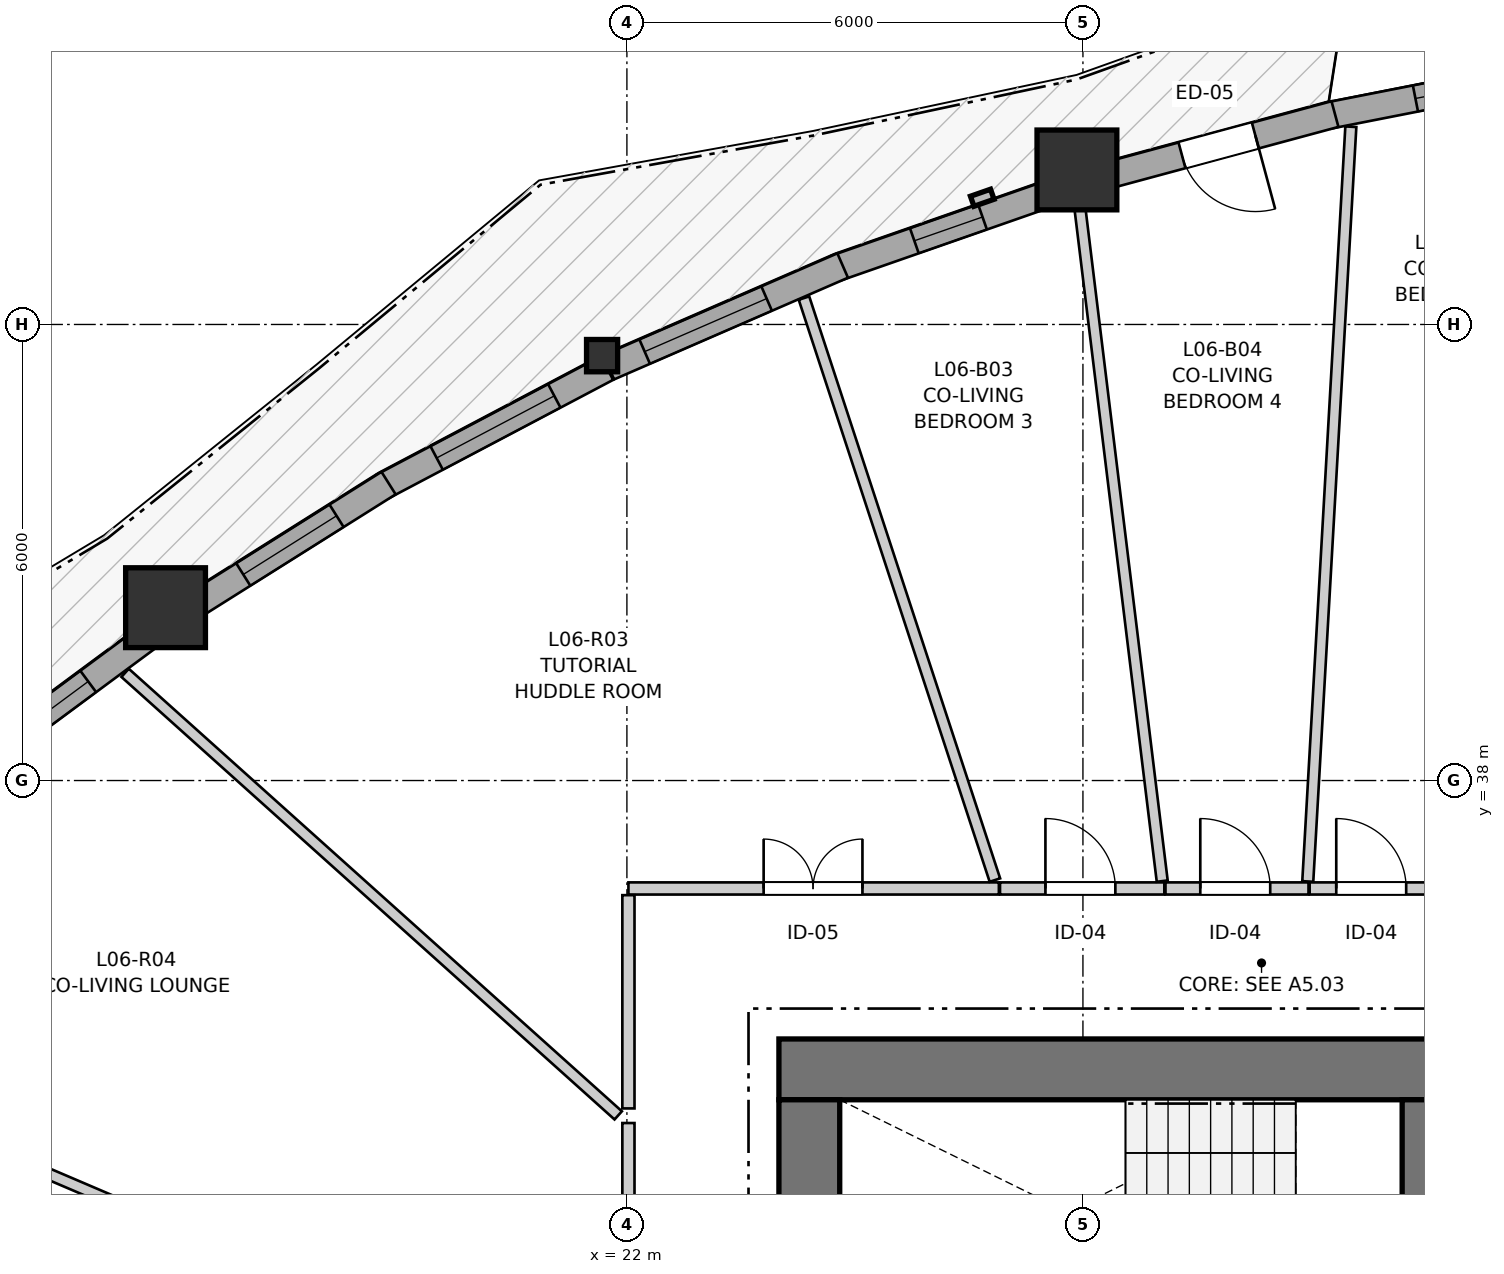
"""IFC4 building model, lengths in metres.
Left out: names, types, materials, properties, quantities, classifications, styles, units other than length and angle.
Written with IfcOpenShell. Run it as: python <this file> out.ifc"""

import sys

from ifc_helpers import new_model, si_unit, direction, frame, frame_2d, origin, origin_2d, place, context, subcontext, project, spatial, rectangle, i_section, extrude, source, transform, mapped, element, fill, save


model = new_model("IFC4")
c1 = context("Model", 3, precision=1e-05, world=origin(), true_north=direction((0.0, 1.0)))
c2 = subcontext(c1, "Body", "Model", "MODEL_VIEW")
j1 = project(units=[si_unit("LENGTHUNIT", "METRE"), si_unit("PLANEANGLEUNIT", "RADIAN")], contexts=[c1])
p1 = place(None, origin())
s1 = spatial("IfcSite", under=j1, at=p1, CompositionType="ELEMENT")
p2 = place(p1, origin())
s2 = spatial("IfcBuilding", under=s1, at=p2, CompositionType="ELEMENT")
p3 = place(p2, frame((0.0, 0.0, 23.8)))
s3 = spatial("IfcBuildingStorey", under=s2, at=p3, CompositionType="ELEMENT", Elevation=23.8)
p4 = place(p3, frame((36.7, 34.2, 0.0), z_axis=(0.0, 0.0, 1.0), x_axis=(-1.0, 0.0, 0.0)))
e1 = element("IfcWall", 1, at=p4, inside=s3, PredefinedType="SHEAR", context=c2, shape_type="SweptSolid", body=[
    extrude(rectangle(XDim=12.7, YDim=0.8, at=frame_2d((6.35, 0.0))), origin(), (0.0, 0.0, 1.0), 2.935),
])
p5 = place(p3, frame((24.4, 33.8, 0.0), z_axis=(0.0, 0.0, 1.0), x_axis=(0.0, -1.0, 0.0)))
e2 = element("IfcWall", 2, at=p5, inside=s3, PredefinedType="SHEAR", context=c2, shape_type="SweptSolid", body=[
    extrude(rectangle(XDim=15.6, YDim=0.8, at=frame_2d((7.8, 0.0))), origin(), (0.0, 0.0, 1.0), 2.935),
])
p6 = place(p5, frame((7.05, 0.0, 0.0)))
e3 = element("IfcOpeningElement", 3, at=p6, cuts=e2, PredefinedType="OPENING", context=c2, shape_type="SweptSolid", body=[
    extrude(rectangle(XDim=1.5, YDim=2.15, at=frame_2d((0.75, 1.075))), frame((0.0, 0.41, 0.0), z_axis=(0.0, -1.0, 0.0), x_axis=(1.0, 0.0, 0.0)), (0.0, 0.0, 1.0), 0.82),
])
p7 = place(p5, frame((3.52, 0.0, 0.0)))
e4 = element("IfcOpeningElement", 4, at=p7, cuts=e2, PredefinedType="OPENING", context=c2, shape_type="SweptSolid", body=[
    extrude(rectangle(XDim=0.86, YDim=2.05, at=frame_2d((0.43, 1.025))), frame((0.0, 0.41, 0.0), z_axis=(0.0, -1.0, 0.0), x_axis=(1.0, 0.0, 0.0)), (0.0, 0.0, 1.0), 0.82),
])
p8 = place(p5, frame((11.22, 0.0, 0.0)))
e5 = element("IfcOpeningElement", 5, at=p8, cuts=e2, PredefinedType="OPENING", context=c2, shape_type="SweptSolid", body=[
    extrude(rectangle(XDim=0.86, YDim=2.05, at=frame_2d((0.43, 1.025))), frame((0.0, 0.41, 0.0), z_axis=(0.0, -1.0, 0.0), x_axis=(1.0, 0.0, 0.0)), (0.0, 0.0, 1.0), 0.82),
])
p9 = place(p3, frame((32.4, 30.85, 0.0), z_axis=(0.0, 0.0, 1.0), x_axis=(0.0, 1.0, 0.0)))
e6 = element("IfcWall", 6, at=p9, inside=s3, PredefinedType="SHEAR", context=c2, shape_type="SweptSolid", body=[
    extrude(rectangle(XDim=2.95, YDim=0.4, at=frame_2d((1.475, 0.0))), origin(), (0.0, 0.0, 1.0), 2.935),
])
m1 = source(origin(), c2, "Body", "SweptSolid", [
    extrude(rectangle(XDim=1.05, YDim=1.05, at=origin_2d()), origin(), (0.0, 0.0, 1.0), 2.935),
])
p10 = place(p3, frame((27.921, 46.033, 0.0), z_axis=(0.0, 0.0, 1.0), x_axis=(1.0, 0.0, 0.0)))
e7 = element("IfcColumn", 7, at=p10, inside=s3, PredefinedType="COLUMN", context=c2, shape_type="MappedRepresentation", body=[
    mapped(m1, transform((0.0, 0.0, 0.0), x_axis=(1.0, 0.0, 0.0), y_axis=(0.0, 1.0, 0.0), z_axis=(0.0, 0.0, 1.0), scale=1.0)),
])
m2 = source(origin(), c2, "Body", "SweptSolid", [
    extrude(i_section(OverallWidth=0.409, OverallDepth=0.425, WebThickness=0.03, FlangeThickness=0.048, FilletRadius=0.015, at=origin_2d()), origin(), (0.0, 0.0, 1.0), 2.935),
])
p11 = place(p3, frame((21.673, 43.59, 0.0), z_axis=(0.0, 0.0, 1.0), x_axis=(1.0, 0.0, 0.0)))
e8 = element("IfcColumn", 8, at=p11, inside=s3, PredefinedType="PILASTER", context=c2, shape_type="MappedRepresentation", body=[
    mapped(m2, transform((0.0, 0.0, 0.0), x_axis=(1.0, 0.0, 0.0), y_axis=(0.0, 1.0, 0.0), z_axis=(0.0, 0.0, 1.0), scale=1.0)),
])
p12 = place(p3, frame((15.93, 40.274, 0.0), z_axis=(0.0, 0.0, 1.0), x_axis=(1.0, 0.0, 0.0)))
e9 = element("IfcColumn", 9, at=p12, inside=s3, PredefinedType="COLUMN", context=c2, shape_type="MappedRepresentation", body=[
    mapped(m1, transform((0.0, 0.0, 0.0), x_axis=(1.0, 0.0, 0.0), y_axis=(0.0, 1.0, 0.0), z_axis=(0.0, 0.0, 1.0), scale=1.0)),
])
p13 = place(p3, frame((34.687, 47.427, 0.0), z_axis=(0.0, 0.0, 1.0), x_axis=(-0.981220485855, -0.192889497219, 0.0)))
e10 = element("IfcWall", 10, at=p13, inside=s3, PredefinedType="SOLIDWALL", context=c2, shape_type="SweptSolid", body=[
    extrude(rectangle(XDim=3.522, YDim=0.35, at=frame_2d((1.761, 0.0))), origin(), (0.0, 0.0, 1.0), 2.415),
])
p14 = place(p13, frame((0.956, 0.0, 0.82)))
e11 = element("IfcOpeningElement", 11, at=p14, cuts=e10, PredefinedType="OPENING", context=c2, shape_type="SweptSolid", body=[
    extrude(rectangle(XDim=1.4, YDim=1.35, at=frame_2d((0.7, 0.675))), frame((0.0, 0.185, 0.0), z_axis=(0.0, -1.0, 0.0), x_axis=(1.0, 0.0, 0.0)), (0.0, 0.0, 1.0), 0.37),
])
p15 = place(p3, frame((31.316, 46.768, 0.0), z_axis=(0.0, 0.0, 1.0), x_axis=(-0.965446721184, -0.260600515261, 0.0)))
e12 = element("IfcWall", 12, at=p15, inside=s3, PredefinedType="SOLIDWALL", context=c2, shape_type="SweptSolid", body=[
    extrude(rectangle(XDim=3.169, YDim=0.35, at=frame_2d((1.585, 0.0))), origin(), (0.0, 0.0, 1.0), 2.415),
])
p16 = place(p15, frame((1.085, 0.0, 0.0)))
e13 = element("IfcOpeningElement", 13, at=p16, cuts=e12, PredefinedType="OPENING", context=c2, shape_type="SweptSolid", body=[
    extrude(rectangle(XDim=1.0, YDim=2.1, at=frame_2d((0.5, 1.05))), frame((0.0, 0.185, 0.0), z_axis=(0.0, -1.0, 0.0), x_axis=(1.0, 0.0, 0.0)), (0.0, 0.0, 1.0), 0.37),
])
p17 = place(p3, frame((27.695, 45.769, 0.0), z_axis=(0.0, 0.0, 1.0), x_axis=(-0.94414288081, -0.329536372221, 0.0)))
e14 = element("IfcWall", 14, at=p17, inside=s3, PredefinedType="SOLIDWALL", context=c2, shape_type="SweptSolid", body=[
    extrude(rectangle(XDim=3.113, YDim=0.35, at=frame_2d((1.557, 0.0))), origin(), (0.0, 0.0, 1.0), 2.415),
])
p18 = place(p17, frame((1.077, 0.0, 0.82)))
e15 = element("IfcOpeningElement", 15, at=p18, cuts=e14, PredefinedType="OPENING", context=c2, shape_type="SweptSolid", body=[
    extrude(rectangle(XDim=0.95, YDim=1.35, at=frame_2d((0.475, 0.675))), frame((0.0, 0.185, 0.0), z_axis=(0.0, -1.0, 0.0), x_axis=(1.0, 0.0, 0.0)), (0.0, 0.0, 1.0), 0.37),
])
p19 = place(p3, frame((24.839, 44.775, 0.0), z_axis=(0.0, 0.0, 1.0), x_axis=(-0.917081622701, -0.398699507529, 0.0)))
e16 = element("IfcWall", 16, at=p19, inside=s3, PredefinedType="SOLIDWALL", context=c2, shape_type="SweptSolid", body=[
    extrude(rectangle(XDim=3.356, YDim=0.35, at=frame_2d((1.678, 0.0))), origin(), (0.0, 0.0, 1.0), 2.415),
])
p20 = place(p19, frame((1.091, 0.0, 0.82)))
e17 = element("IfcOpeningElement", 17, at=p20, cuts=e16, PredefinedType="OPENING", context=c2, shape_type="SweptSolid", body=[
    extrude(rectangle(XDim=1.75, YDim=1.3, at=frame_2d((0.875, 0.65))), frame((0.0, 0.185, 0.0), z_axis=(0.0, -1.0, 0.0), x_axis=(1.0, 0.0, 0.0)), (0.0, 0.0, 1.0), 0.37),
])
p21 = place(p3, frame((21.737, 43.426, 0.0), z_axis=(0.0, 0.0, 1.0), x_axis=(-0.884406567815, -0.466717283595, 0.0)))
e18 = element("IfcWall", 18, at=p21, inside=s3, PredefinedType="SOLIDWALL", context=c2, shape_type="SweptSolid", body=[
    extrude(rectangle(XDim=3.336, YDim=0.35, at=frame_2d((1.668, 0.0))), origin(), (0.0, 0.0, 1.0), 2.415),
])
p22 = place(p21, frame((0.783, 0.0, 0.82)))
e19 = element("IfcOpeningElement", 19, at=p22, cuts=e18, PredefinedType="OPENING", context=c2, shape_type="SweptSolid", body=[
    extrude(rectangle(XDim=1.75, YDim=1.3, at=frame_2d((0.875, 0.65))), frame((0.0, 0.185, 0.0), z_axis=(0.0, -1.0, 0.0), x_axis=(1.0, 0.0, 0.0)), (0.0, 0.0, 1.0), 0.37),
])
p23 = place(p3, frame((18.864, 41.913, 0.0), z_axis=(0.0, 0.0, 1.0), x_axis=(-0.84643287852, -0.532495429239, 0.0)))
e20 = element("IfcWall", 20, at=p23, inside=s3, PredefinedType="SOLIDWALL", context=c2, shape_type="SweptSolid", body=[
    extrude(rectangle(XDim=3.056, YDim=0.35, at=frame_2d((1.528, 0.0))), origin(), (0.0, 0.0, 1.0), 2.415),
])
p24 = place(p23, frame((0.808, 0.0, 0.82)))
e21 = element("IfcOpeningElement", 21, at=p24, cuts=e20, PredefinedType="OPENING", context=c2, shape_type="SweptSolid", body=[
    extrude(rectangle(XDim=1.45, YDim=1.25, at=frame_2d((0.725, 0.625))), frame((0.0, 0.185, 0.0), z_axis=(0.0, -1.0, 0.0), x_axis=(1.0, 0.0, 0.0)), (0.0, 0.0, 1.0), 0.37),
])
p25 = place(p3, frame((15.793, 39.955, 0.0), z_axis=(0.0, 0.0, 1.0), x_axis=(-0.803813051054, -0.594881987419, 0.0)))
e22 = element("IfcWall", 22, at=p25, inside=s3, PredefinedType="SOLIDWALL", context=c2, shape_type="SweptSolid", body=[
    extrude(rectangle(XDim=3.075, YDim=0.35, at=frame_2d((1.538, 0.0))), origin(), (0.0, 0.0, 1.0), 2.415),
])
p26 = place(p25, frame((1.095, 0.0, 0.82)))
e23 = element("IfcOpeningElement", 23, at=p26, cuts=e22, PredefinedType="OPENING", context=c2, shape_type="SweptSolid", body=[
    extrude(rectangle(XDim=1.45, YDim=1.25, at=frame_2d((0.725, 0.625))), frame((0.0, 0.185, 0.0), z_axis=(0.0, -1.0, 0.0), x_axis=(1.0, 0.0, 0.0)), (0.0, 0.0, 1.0), 0.37),
])
p27 = place(p3, frame((22.02, 36.58, 0.0), z_axis=(0.0, 0.0, 1.0), x_axis=(1.0, 0.0, 0.0)))
e24 = element("IfcWall", 24, at=p27, inside=s3, PredefinedType="PARTITIONING", context=c2, shape_type="SweptSolid", body=[
    extrude(rectangle(XDim=4.874, YDim=0.16, at=frame_2d((2.437, 0.0))), origin(), (0.0, 0.0, 1.0), 2.543),
])
p28 = place(p27, frame((1.779, 0.0, 0.0)))
e25 = element("IfcOpeningElement", 25, at=p28, cuts=e24, PredefinedType="OPENING", context=c2, shape_type="SweptSolid", body=[
    extrude(rectangle(XDim=1.3, YDim=2.1, at=frame_2d((0.65, 1.05))), frame((0.0, 0.09, 0.0), z_axis=(0.0, -1.0, 0.0), x_axis=(1.0, 0.0, 0.0)), (0.0, 0.0, 1.0), 0.18),
])
p29 = place(p3, frame((22.02, 29.545, 0.0), z_axis=(0.0, 0.0, 1.0), x_axis=(0.0, 1.0, 0.0)))
e26 = element("IfcWall", 26, at=p29, inside=s3, PredefinedType="PARTITIONING", context=c2, shape_type="SweptSolid", body=[
    extrude(rectangle(XDim=3.949, YDim=0.16, at=frame_2d((1.975, 0.0))), origin(), (0.0, 0.0, 1.0), 2.935),
])
p30 = place(p29, frame((1.323, 0.0, 0.0)))
e27 = element("IfcOpeningElement", 27, at=p30, cuts=e26, PredefinedType="OPENING", context=c2, shape_type="SweptSolid", body=[
    extrude(rectangle(XDim=1.3, YDim=2.1, at=frame_2d((0.65, 1.05))), frame((0.0, 0.09, 0.0), z_axis=(0.0, -1.0, 0.0), x_axis=(1.0, 0.0, 0.0)), (0.0, 0.0, 1.0), 0.18),
])
p31 = place(p3, frame((26.909, 36.58, 0.0), z_axis=(0.0, 0.0, 1.0), x_axis=(1.0, 0.0, 0.0)))
e28 = element("IfcWall", 28, at=p31, inside=s3, PredefinedType="PARTITIONING", context=c2, shape_type="SweptSolid", body=[
    extrude(rectangle(XDim=2.162, YDim=0.16, at=frame_2d((1.081, 0.0))), origin(), (0.0, 0.0, 1.0), 2.935),
])
p32 = place(p31, frame((0.597, 0.0, 0.0)))
e29 = element("IfcOpeningElement", 29, at=p32, cuts=e28, PredefinedType="OPENING", context=c2, shape_type="SweptSolid", body=[
    extrude(rectangle(XDim=0.92, YDim=2.1, at=frame_2d((0.46, 1.05))), frame((0.0, 0.09, 0.0), z_axis=(0.0, -1.0, 0.0), x_axis=(1.0, 0.0, 0.0)), (0.0, 0.0, 1.0), 0.18),
])
p33 = place(p3, frame((29.086, 36.58, 0.0), z_axis=(0.0, 0.0, 1.0), x_axis=(1.0, 0.0, 0.0)))
e30 = element("IfcWall", 30, at=p33, inside=s3, PredefinedType="PARTITIONING", context=c2, shape_type="SweptSolid", body=[
    extrude(rectangle(XDim=1.882, YDim=0.16, at=frame_2d((0.941, 0.0))), origin(), (0.0, 0.0, 1.0), 2.935),
])
p34 = place(p33, frame((0.458, 0.0, 0.0)))
e31 = element("IfcOpeningElement", 31, at=p34, cuts=e30, PredefinedType="OPENING", context=c2, shape_type="SweptSolid", body=[
    extrude(rectangle(XDim=0.92, YDim=2.1, at=frame_2d((0.46, 1.05))), frame((0.0, 0.09, 0.0), z_axis=(0.0, -1.0, 0.0), x_axis=(1.0, 0.0, 0.0)), (0.0, 0.0, 1.0), 0.18),
])
p35 = place(p3, frame((30.983, 36.58, 0.0), z_axis=(0.0, 0.0, 1.0), x_axis=(1.0, 0.0, 0.0)))
e32 = element("IfcWall", 32, at=p35, inside=s3, PredefinedType="PARTITIONING", context=c2, shape_type="SweptSolid", body=[
    extrude(rectangle(XDim=1.665, YDim=0.16, at=frame_2d((0.833, 0.0))), origin(), (0.0, 0.0, 1.0), 2.935),
])
p36 = place(p35, frame((0.35, 0.0, 0.0)))
e33 = element("IfcOpeningElement", 33, at=p36, cuts=e32, PredefinedType="OPENING", context=c2, shape_type="SweptSolid", body=[
    extrude(rectangle(XDim=0.92, YDim=2.1, at=frame_2d((0.46, 1.05))), frame((0.0, 0.09, 0.0), z_axis=(0.0, -1.0, 0.0), x_axis=(1.0, 0.0, 0.0)), (0.0, 0.0, 1.0), 0.18),
])
p37 = place(p3, frame((9.869, 34.757, 0.0), z_axis=(0.0, 0.0, 1.0), x_axis=(0.919492001568, -0.393108711493, 0.0)))
e34 = element("IfcWall", 34, at=p37, inside=s3, PredefinedType="PARTITIONING", context=c2, shape_type="SweptSolid", body=[
    extrude(rectangle(XDim=13.089, YDim=0.145, at=frame_2d((6.544, 0.0))), origin(), (0.0, 0.0, 1.0), 2.935),
])
p38 = place(p3, frame((30.958, 36.672, 0.0), z_axis=(0.0, 0.0, 1.0), x_axis=(0.056976385457, 0.998375526293, 0.0)))
e35 = element("IfcWall", 35, at=p38, inside=s3, PredefinedType="PARTITIONING", context=c2, shape_type="SweptSolid", body=[
    extrude(rectangle(XDim=9.945, YDim=0.145, at=frame_2d((4.973, 0.0))), origin(), (0.0, 0.0, 1.0), 2.935),
])
p39 = place(p3, frame((27.942, 45.68, 0.0), z_axis=(0.0, 0.0, 1.0), x_axis=(0.12142050141, -0.992601159498, 0.0)))
e36 = element("IfcWall", 36, at=p39, inside=s3, PredefinedType="PARTITIONING", context=c2, shape_type="SweptSolid", body=[
    extrude(rectangle(XDim=9.07, YDim=0.145, at=frame_2d((4.535, 0.0))), origin(), (0.0, 0.0, 1.0), 2.303),
])
p40 = place(p3, frame((15.398, 39.417, 0.0), z_axis=(0.0, 0.0, 1.0), x_axis=(0.744248709075, -0.667902581998, 0.0)))
e37 = element("IfcWall", 37, at=p40, inside=s3, PredefinedType="PARTITIONING", context=c2, shape_type="SweptSolid", body=[
    extrude(rectangle(XDim=8.717, YDim=0.145, at=frame_2d((4.359, 0.0))), origin(), (0.0, 0.0, 1.0), 2.935),
])
p41 = place(p3, frame((24.33, 44.347, 0.0), z_axis=(0.0, 0.0, 1.0), x_axis=(0.311716142238, -0.950175271552, 0.0)))
e38 = element("IfcWall", 38, at=p41, inside=s3, PredefinedType="PARTITIONING", context=c2, shape_type="SweptSolid", body=[
    extrude(rectangle(XDim=8.059, YDim=0.145, at=frame_2d((4.029, 0.0))), origin(), (0.0, 0.0, 1.0), 2.935),
])
p42 = place(p3, frame((22.02, 33.686, 0.0), z_axis=(0.0, 0.0, 1.0), x_axis=(0.0, 1.0, 0.0)))
e39 = element("IfcWall", 39, at=p42, inside=s3, PredefinedType="PARTITIONING", context=c2, shape_type="SweptSolid", body=[
    extrude(rectangle(XDim=2.806, YDim=0.16, at=frame_2d((1.403, 0.0))), origin(), (0.0, 0.0, 1.0), 2.935),
])
m3 = source(origin(), c2, "Body", "SweptSolid", [
    extrude(rectangle(XDim=1.4, YDim=1.35, at=frame_2d((0.7, 0.675))), frame((0.0, 0.03, 0.0), z_axis=(0.0, -1.0, 0.0), x_axis=(1.0, 0.0, 0.0)), (0.0, 0.0, 1.0), 0.06),
])
p43 = place(p14, origin())
e40 = element("IfcWindow", 40, at=p43, inside=s3, PartitioningType="SINGLE_PANEL", PredefinedType="WINDOW", context=c2, shape_type="MappedRepresentation", body=[
    mapped(m3, transform((0.0, 0.0, 0.0), x_axis=(1.0, 0.0, 0.0), y_axis=(0.0, 1.0, 0.0), z_axis=(0.0, 0.0, 1.0), scale=1.0)),
])
fill(e11, e40)
m4 = source(origin(), c2, "Body", "SweptSolid", [
    extrude(rectangle(XDim=0.95, YDim=1.35, at=frame_2d((0.475, 0.675))), frame((0.0, 0.03, 0.0), z_axis=(0.0, -1.0, 0.0), x_axis=(1.0, 0.0, 0.0)), (0.0, 0.0, 1.0), 0.06),
])
p44 = place(p18, origin())
e41 = element("IfcWindow", 41, at=p44, inside=s3, PartitioningType="SINGLE_PANEL", PredefinedType="WINDOW", context=c2, shape_type="MappedRepresentation", body=[
    mapped(m4, transform((0.0, 0.0, 0.0), x_axis=(1.0, 0.0, 0.0), y_axis=(0.0, 1.0, 0.0), z_axis=(0.0, 0.0, 1.0), scale=1.0)),
])
fill(e15, e41)
m5 = source(origin(), c2, "Body", "SweptSolid", [
    extrude(rectangle(XDim=1.75, YDim=1.3, at=frame_2d((0.875, 0.65))), frame((0.0, 0.03, 0.0), z_axis=(0.0, -1.0, 0.0), x_axis=(1.0, 0.0, 0.0)), (0.0, 0.0, 1.0), 0.06),
])
p45 = place(p20, origin())
e42 = element("IfcWindow", 42, at=p45, inside=s3, PartitioningType="SINGLE_PANEL", PredefinedType="WINDOW", context=c2, shape_type="MappedRepresentation", body=[
    mapped(m5, transform((0.0, 0.0, 0.0), x_axis=(1.0, 0.0, 0.0), y_axis=(0.0, 1.0, 0.0), z_axis=(0.0, 0.0, 1.0), scale=1.0)),
])
fill(e17, e42)
p46 = place(p22, origin())
e43 = element("IfcWindow", 43, at=p46, inside=s3, PartitioningType="SINGLE_PANEL", PredefinedType="WINDOW", context=c2, shape_type="MappedRepresentation", body=[
    mapped(m5, transform((0.0, 0.0, 0.0), x_axis=(1.0, 0.0, 0.0), y_axis=(0.0, 1.0, 0.0), z_axis=(0.0, 0.0, 1.0), scale=1.0)),
])
fill(e19, e43)
m6 = source(origin(), c2, "Body", "SweptSolid", [
    extrude(rectangle(XDim=1.45, YDim=1.25, at=frame_2d((0.725, 0.625))), frame((0.0, 0.03, 0.0), z_axis=(0.0, -1.0, 0.0), x_axis=(1.0, 0.0, 0.0)), (0.0, 0.0, 1.0), 0.06),
])
p47 = place(p24, origin())
e44 = element("IfcWindow", 44, at=p47, inside=s3, PartitioningType="SINGLE_PANEL", PredefinedType="WINDOW", context=c2, shape_type="MappedRepresentation", body=[
    mapped(m6, transform((0.0, 0.0, 0.0), x_axis=(1.0, 0.0, 0.0), y_axis=(0.0, 1.0, 0.0), z_axis=(0.0, 0.0, 1.0), scale=1.0)),
])
fill(e21, e44)
p48 = place(p26, origin())
e45 = element("IfcWindow", 45, at=p48, inside=s3, PartitioningType="SINGLE_PANEL", PredefinedType="WINDOW", context=c2, shape_type="MappedRepresentation", body=[
    mapped(m6, transform((0.0, 0.0, 0.0), x_axis=(1.0, 0.0, 0.0), y_axis=(0.0, 1.0, 0.0), z_axis=(0.0, 0.0, 1.0), scale=1.0)),
])
fill(e23, e45)
m7 = source(origin(), c2, "Body", "SweptSolid", [
    extrude(rectangle(XDim=1.0, YDim=2.1, at=frame_2d((0.5, 1.05))), frame((0.0, 0.025, 0.0), z_axis=(0.0, -1.0, 0.0), x_axis=(1.0, 0.0, 0.0)), (0.0, 0.0, 1.0), 0.05),
])
p49 = place(p16, origin())
e46 = element("IfcDoor", 46, at=p49, inside=s3, OperationType="SINGLE_SWING_LEFT", PredefinedType="DOOR", context=c2, shape_type="MappedRepresentation", body=[
    mapped(m7, transform((0.0, 0.0, 0.0), x_axis=(1.0, 0.0, 0.0), y_axis=(0.0, 1.0, 0.0), z_axis=(0.0, 0.0, 1.0), scale=1.0)),
])
fill(e13, e46)
m8 = source(origin(), c2, "Body", "SweptSolid", [
    extrude(rectangle(XDim=1.3, YDim=2.1, at=frame_2d((0.65, 1.05))), frame((0.0, 0.025, 0.0), z_axis=(0.0, -1.0, 0.0), x_axis=(1.0, 0.0, 0.0)), (0.0, 0.0, 1.0), 0.05),
])
p50 = place(p28, origin())
e47 = element("IfcDoor", 47, at=p50, inside=s3, OperationType="DOUBLE_DOOR_SINGLE_SWING", PredefinedType="DOOR", context=c2, shape_type="MappedRepresentation", body=[
    mapped(m8, transform((0.0, 0.0, 0.0), x_axis=(1.0, 0.0, 0.0), y_axis=(0.0, 1.0, 0.0), z_axis=(0.0, 0.0, 1.0), scale=1.0)),
])
fill(e25, e47)
m9 = source(origin(), c2, "Body", "SweptSolid", [
    extrude(rectangle(XDim=0.92, YDim=2.1, at=frame_2d((0.46, 1.05))), frame((0.0, 0.025, 0.0), z_axis=(0.0, -1.0, 0.0), x_axis=(1.0, 0.0, 0.0)), (0.0, 0.0, 1.0), 0.05),
])
p51 = place(p32, origin())
e48 = element("IfcDoor", 48, at=p51, inside=s3, OperationType="SINGLE_SWING_LEFT", PredefinedType="DOOR", context=c2, shape_type="MappedRepresentation", body=[
    mapped(m9, transform((0.0, 0.0, 0.0), x_axis=(1.0, 0.0, 0.0), y_axis=(0.0, 1.0, 0.0), z_axis=(0.0, 0.0, 1.0), scale=1.0)),
])
fill(e29, e48)
p52 = place(p34, origin())
e49 = element("IfcDoor", 49, at=p52, inside=s3, OperationType="SINGLE_SWING_LEFT", PredefinedType="DOOR", context=c2, shape_type="MappedRepresentation", body=[
    mapped(m9, transform((0.0, 0.0, 0.0), x_axis=(1.0, 0.0, 0.0), y_axis=(0.0, 1.0, 0.0), z_axis=(0.0, 0.0, 1.0), scale=1.0)),
])
fill(e31, e49)
p53 = place(p36, origin())
e50 = element("IfcDoor", 50, at=p53, inside=s3, OperationType="SINGLE_SWING_LEFT", PredefinedType="DOOR", context=c2, shape_type="MappedRepresentation", body=[
    mapped(m9, transform((0.0, 0.0, 0.0), x_axis=(1.0, 0.0, 0.0), y_axis=(0.0, 1.0, 0.0), z_axis=(0.0, 0.0, 1.0), scale=1.0)),
])
fill(e33, e50)
save(model, sys.argv[1])
